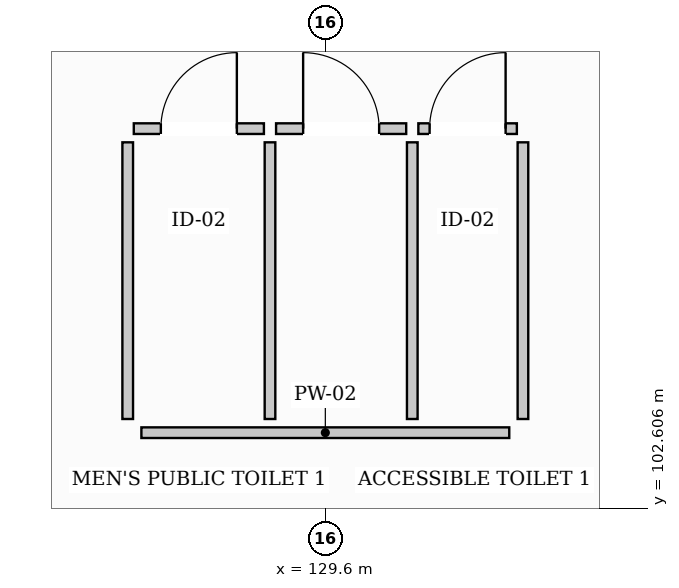
"""IFC4 building model, lengths in metres.
Left out: names, types, materials, properties, quantities, classifications, styles, units other than length and angle.
Written with IfcOpenShell. Run it as: python <this file> out.ifc"""

import sys

from ifc_helpers import new_model, si_unit, direction, frame, frame_2d, origin, place, context, subcontext, project, spatial, rectangle, extrude, element, fill, save


model = new_model("IFC4")
c1 = context("Model", 3, precision=1e-05, world=origin(), true_north=direction((0.0, 1.0)))
c2 = subcontext(c1, "Body", "Model", "MODEL_VIEW")
j1 = project(units=[si_unit("LENGTHUNIT", "METRE"), si_unit("PLANEANGLEUNIT", "RADIAN")], contexts=[c1])
p1 = place(None, origin())
s1 = spatial("IfcSite", under=j1, at=p1, CompositionType="ELEMENT")
p2 = place(p1, origin())
s2 = spatial("IfcBuilding", under=s1, at=p2, CompositionType="ELEMENT")
p3 = place(p2, frame((0.0, 0.0, 16.8)))
s3 = spatial("IfcBuildingStorey", under=s2, at=p3, CompositionType="ELEMENT", Elevation=16.8)
p4 = place(p3, frame((127.18, 103.6, 0.0), z_axis=(0.0, 0.0, 1.0), x_axis=(1.0, 0.0, 0.0)))
e1 = element("IfcWall", 1, at=p4, inside=s3, PredefinedType="PARTITIONING", context=c2, shape_type="SweptSolid", body=[
    extrude(rectangle(XDim=4.84, YDim=0.14, at=frame_2d((2.42, 0.0))), origin(), (0.0, 0.0, 1.0), 2.57),
])
for number, where, z_axis, x_axis in (
    (2, (127.0, 103.78, 0.0), (0.0, 0.0, 1.0), (0.0, 1.0, 0.0)),
    (3, (132.2, 103.78, 0.0), (0.0, 0.0, 1.0), (0.0, 1.0, 0.0)),
    (4, (128.872, 103.78, 0.0), (0.0, 0.0, 1.0), (0.0, 1.0, 0.0)),
    (5, (130.744, 103.78, 0.0), (0.0, 0.0, 1.0), (0.0, 1.0, 0.0)),
):
    element("IfcWall", number, at=place(p3, frame(where, z_axis=z_axis, x_axis=x_axis)), inside=s3, PredefinedType="PARTITIONING", context=c2, shape_type="SweptSolid", body=[
        extrude(rectangle(XDim=3.64, YDim=0.14, at=frame_2d((1.82, 0.0))), origin(), (0.0, 0.0, 1.0), 3.32),
    ])
p5 = place(p3, frame((127.08, 107.6, 0.0), z_axis=(0.0, 0.0, 1.0), x_axis=(1.0, 0.0, 0.0)))
e6 = element("IfcWall", 6, at=p5, inside=s3, PredefinedType="PARTITIONING", context=c2, shape_type="SweptSolid", body=[
    extrude(rectangle(XDim=1.712, YDim=0.14, at=frame_2d((0.856, 0.0))), origin(), (0.0, 0.0, 1.0), 3.32),
])
p6 = place(p5, frame((0.356, 0.0, 0.0)))
e7 = element("IfcOpeningElement", 7, at=p6, cuts=e6, PredefinedType="OPENING", context=c2, shape_type="SweptSolid", body=[
    extrude(rectangle(XDim=1.0, YDim=2.15, at=frame_2d((0.5, 1.075))), frame((0.0, 0.08, 0.0), z_axis=(0.0, -1.0, 0.0), x_axis=(1.0, 0.0, 0.0)), (0.0, 0.0, 1.0), 0.16),
])
p7 = place(p3, frame((128.952, 107.6, 0.0), z_axis=(0.0, 0.0, 1.0), x_axis=(1.0, 0.0, 0.0)))
e8 = element("IfcWall", 8, at=p7, inside=s3, PredefinedType="PARTITIONING", context=c2, shape_type="SweptSolid", body=[
    extrude(rectangle(XDim=1.712, YDim=0.14, at=frame_2d((0.856, 0.0))), origin(), (0.0, 0.0, 1.0), 2.57),
])
p8 = place(p7, frame((0.356, 0.0, 0.0)))
e9 = element("IfcOpeningElement", 9, at=p8, cuts=e8, PredefinedType="OPENING", context=c2, shape_type="SweptSolid", body=[
    extrude(rectangle(XDim=1.0, YDim=2.15, at=frame_2d((0.5, 1.075))), frame((0.0, 0.08, 0.0), z_axis=(0.0, -1.0, 0.0), x_axis=(1.0, 0.0, 0.0)), (0.0, 0.0, 1.0), 0.16),
])
p9 = place(p3, frame((130.824, 107.6, 0.0), z_axis=(0.0, 0.0, 1.0), x_axis=(1.0, 0.0, 0.0)))
e10 = element("IfcWall", 10, at=p9, inside=s3, PredefinedType="PARTITIONING", context=c2, shape_type="SweptSolid", body=[
    extrude(rectangle(XDim=1.296, YDim=0.14, at=frame_2d((0.648, 0.0))), origin(), (0.0, 0.0, 1.0), 3.32),
])
p10 = place(p9, frame((0.148, 0.0, 0.0)))
e11 = element("IfcOpeningElement", 11, at=p10, cuts=e10, PredefinedType="OPENING", context=c2, shape_type="SweptSolid", body=[
    extrude(rectangle(XDim=1.0, YDim=2.15, at=frame_2d((0.5, 1.075))), frame((0.0, 0.08, 0.0), z_axis=(0.0, -1.0, 0.0), x_axis=(1.0, 0.0, 0.0)), (0.0, 0.0, 1.0), 0.16),
])
p11 = place(p6, origin())
e12 = element("IfcDoor", 12, at=p11, inside=s3, OperationType="SINGLE_SWING_RIGHT", PredefinedType="DOOR", context=c2, shape_type="SweptSolid", body=[
    extrude(rectangle(XDim=1.0, YDim=2.15, at=frame_2d((0.5, 1.075))), frame((0.0, 0.025, 0.0), z_axis=(0.0, -1.0, 0.0), x_axis=(1.0, 0.0, 0.0)), (0.0, 0.0, 1.0), 0.05),
])
fill(e7, e12)
p12 = place(p8, origin())
e13 = element("IfcDoor", 13, at=p12, inside=s3, OperationType="SINGLE_SWING_LEFT", PredefinedType="DOOR", context=c2, shape_type="SweptSolid", body=[
    extrude(rectangle(XDim=1.0, YDim=2.15, at=frame_2d((0.5, 1.075))), frame((0.0, 0.025, 0.0), z_axis=(0.0, -1.0, 0.0), x_axis=(1.0, 0.0, 0.0)), (0.0, 0.0, 1.0), 0.05),
])
fill(e9, e13)
p13 = place(p10, origin())
e14 = element("IfcDoor", 14, at=p13, inside=s3, OperationType="SINGLE_SWING_RIGHT", PredefinedType="DOOR", context=c2, shape_type="SweptSolid", body=[
    extrude(rectangle(XDim=1.0, YDim=2.15, at=frame_2d((0.5, 1.075))), frame((0.0, 0.025, 0.0), z_axis=(0.0, -1.0, 0.0), x_axis=(1.0, 0.0, 0.0)), (0.0, 0.0, 1.0), 0.05),
])
fill(e11, e14)
save(model, sys.argv[1])
